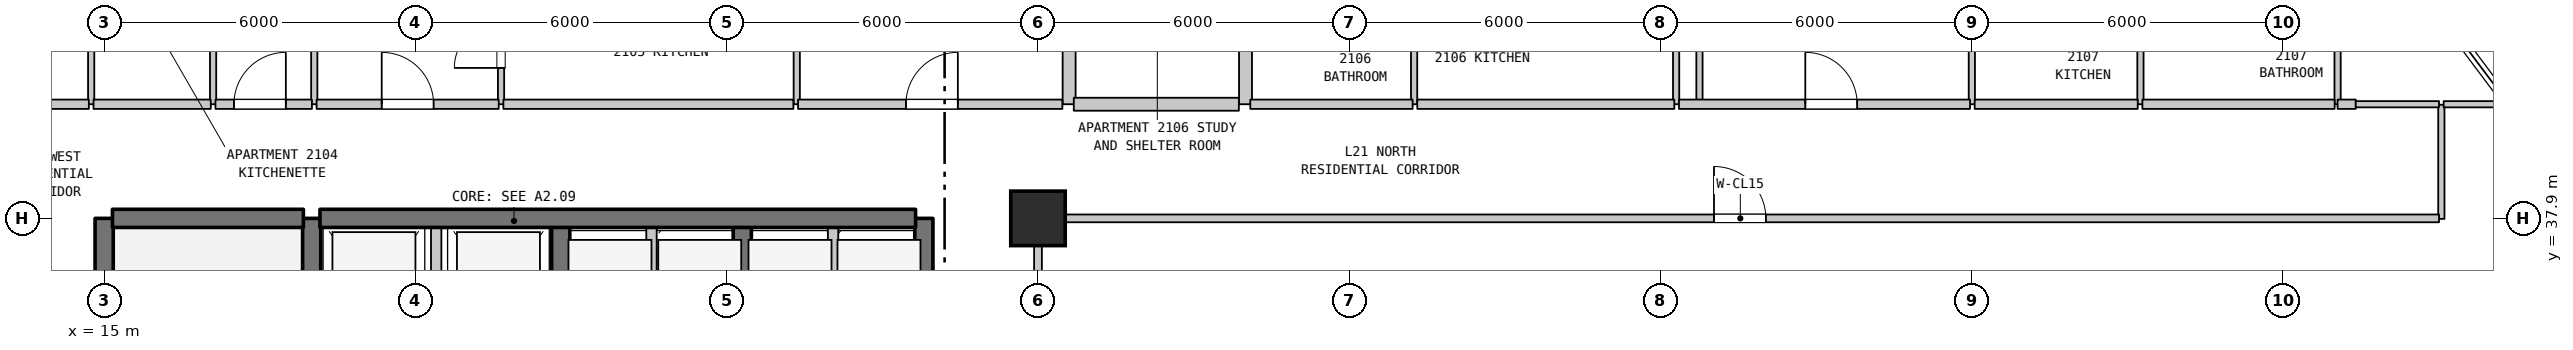
"""IFC4 building model, lengths in metres.
Left out: names, types, materials, properties, quantities, classifications, styles, units other than length and angle.
Written with IfcOpenShell. Run it as: python <this file> out.ifc"""

import sys

from ifc_helpers import new_model, si_unit, direction, frame, frame_2d, origin, origin_2d, place, context, subcontext, project, spatial, rectangle, extrude, element, fill, save


model = new_model("IFC4")
c1 = context("Model", 3, precision=1e-05, world=origin(), true_north=direction((0.0, 1.0)))
c2 = subcontext(c1, "Body", "Model", "MODEL_VIEW")
j1 = project(units=[si_unit("LENGTHUNIT", "METRE"), si_unit("PLANEANGLEUNIT", "RADIAN")], contexts=[c1])
p1 = place(None, origin())
s1 = spatial("IfcSite", under=j1, at=p1, CompositionType="ELEMENT")
p2 = place(p1, origin())
s2 = spatial("IfcBuilding", under=s1, at=p2, CompositionType="ELEMENT")
p3 = place(p2, frame((0.0, 0.0, 90.9)))
s3 = spatial("IfcBuildingStorey", under=s2, at=p3, CompositionType="ELEMENT", Elevation=90.9)
p4 = place(p3, frame((33.0, 37.9, 0.0), z_axis=(0.0, 0.0, 1.0), x_axis=(1.0, 0.0, 0.0)))
e1 = element("IfcColumn", 1, at=p4, inside=s3, PredefinedType="COLUMN", context=c2, shape_type="SweptSolid", body=[
    extrude(rectangle(XDim=1.05, YDim=1.05, at=origin_2d()), origin(), (0.0, 0.0, 1.0), 3.7),
])
p5 = place(p3, frame((14.75, 40.1, 0.0), z_axis=(0.0, 0.0, 1.0), x_axis=(0.0, 1.0, 0.0)))
e2 = element("IfcWall", 2, at=p5, inside=s3, PredefinedType="PARTITIONING", context=c2, shape_type="SweptSolid", body=[
    extrude(rectangle(XDim=3.2, YDim=0.12, at=frame_2d((1.6, 0.0))), origin(), (0.0, 0.0, 1.0), 3.385),
])
p6 = place(p5, frame((1.15, 0.0, 0.0)))
e3 = element("IfcOpeningElement", 3, at=p6, cuts=e2, PredefinedType="OPENING", context=c2, shape_type="SweptSolid", body=[
    extrude(rectangle(XDim=0.9, YDim=2.15, at=frame_2d((0.45, 1.075))), frame((0.0, 0.07, 0.0), z_axis=(0.0, -1.0, 0.0), x_axis=(1.0, 0.0, 0.0)), (0.0, 0.0, 1.0), 0.14),
])
p7 = place(p3, frame((15.0, 31.1, 0.0), z_axis=(0.0, 0.0, 1.0), x_axis=(0.0, 1.0, 0.0)))
e4 = element("IfcWall", 4, at=p7, inside=s3, PredefinedType="SHEAR", context=c2, shape_type="SweptSolid", body=[
    extrude(rectangle(XDim=6.8, YDim=0.35, at=frame_2d((3.4, 0.0))), origin(), (0.0, 0.0, 1.0), 3.385),
])
p8 = place(p3, frame((17.1, 40.1, 0.0), z_axis=(0.0, 0.0, 1.0), x_axis=(0.0, 1.0, 0.0)))
e5 = element("IfcWall", 5, at=p8, inside=s3, PredefinedType="PARTITIONING", context=c2, shape_type="SweptSolid", body=[
    extrude(rectangle(XDim=3.2, YDim=0.12, at=frame_2d((1.6, 0.0))), origin(), (0.0, 0.0, 1.0), 3.385),
])
p9 = place(p3, frame((19.0, 35.0, 0.0), z_axis=(0.0, 0.0, 1.0), x_axis=(0.0, 1.0, 0.0)))
e6 = element("IfcWall", 6, at=p9, inside=s3, PredefinedType="SHEAR", context=c2, shape_type="SweptSolid", body=[
    extrude(rectangle(XDim=2.9, YDim=0.35, at=frame_2d((1.45, 0.0))), origin(), (0.0, 0.0, 1.0), 3.385),
])
p10 = place(p3, frame((19.05, 40.1, 0.0), z_axis=(0.0, 0.0, 1.0), x_axis=(0.0, 1.0, 0.0)))
e7 = element("IfcWall", 7, at=p10, inside=s3, PredefinedType="PARTITIONING", context=c2, shape_type="SweptSolid", body=[
    extrude(rectangle(XDim=13.79, YDim=0.12, at=frame_2d((6.895, 0.0))), origin(), (0.0, 0.0, 1.0), 3.385),
])
p11 = place(p3, frame((21.4, 35.0, 0.0), z_axis=(0.0, 0.0, 1.0), x_axis=(0.0, 1.0, 0.0)))
e8 = element("IfcWall", 8, at=p11, inside=s3, PredefinedType="STANDARD", context=c2, shape_type="SweptSolid", body=[
    extrude(rectangle(XDim=2.9, YDim=0.2, at=frame_2d((1.45, 0.0))), origin(), (0.0, 0.0, 1.0), 3.385),
])
p12 = place(p3, frame((22.65, 40.1, 0.0), z_axis=(0.0, 0.0, 1.0), x_axis=(0.0, 1.0, 0.0)))
e9 = element("IfcWall", 9, at=p12, inside=s3, PredefinedType="PARTITIONING", context=c2, shape_type="SweptSolid", body=[
    extrude(rectangle(XDim=2.3, YDim=0.12, at=frame_2d((1.15, 0.0))), origin(), (0.0, 0.0, 1.0), 3.385),
])
p13 = place(p12, frame((0.7, 0.0, 0.0)))
e10 = element("IfcOpeningElement", 10, at=p13, cuts=e9, PredefinedType="OPENING", context=c2, shape_type="SweptSolid", body=[
    extrude(rectangle(XDim=0.9, YDim=2.15, at=frame_2d((0.45, 1.075))), frame((0.0, 0.07, 0.0), z_axis=(0.0, -1.0, 0.0), x_axis=(1.0, 0.0, 0.0)), (0.0, 0.0, 1.0), 0.14),
])
p14 = place(p3, frame((23.8, 35.0, 0.0), z_axis=(0.0, 0.0, 1.0), x_axis=(0.0, 1.0, 0.0)))
e11 = element("IfcWall", 11, at=p14, inside=s3, PredefinedType="SHEAR", context=c2, shape_type="SweptSolid", body=[
    extrude(rectangle(XDim=2.9, YDim=0.35, at=frame_2d((1.45, 0.0))), origin(), (0.0, 0.0, 1.0), 3.385),
])
p15 = place(p3, frame((25.55, 35.0, 0.0), z_axis=(0.0, 0.0, 1.0), x_axis=(0.0, 1.0, 0.0)))
e12 = element("IfcWall", 12, at=p15, inside=s3, PredefinedType="STANDARD", context=c2, shape_type="SweptSolid", body=[
    extrude(rectangle(XDim=2.9, YDim=0.2, at=frame_2d((1.45, 0.0))), origin(), (0.0, 0.0, 1.0), 3.385),
])
p16 = place(p3, frame((27.3, 35.0, 0.0), z_axis=(0.0, 0.0, 1.0), x_axis=(0.0, 1.0, 0.0)))
e13 = element("IfcWall", 13, at=p16, inside=s3, PredefinedType="SHEAR", context=c2, shape_type="SweptSolid", body=[
    extrude(rectangle(XDim=2.9, YDim=0.35, at=frame_2d((1.45, 0.0))), origin(), (0.0, 0.0, 1.0), 3.385),
])
p17 = place(p3, frame((28.35, 40.1, 0.0), z_axis=(0.0, 0.0, 1.0), x_axis=(0.0, 1.0, 0.0)))
e14 = element("IfcWall", 14, at=p17, inside=s3, PredefinedType="PARTITIONING", context=c2, shape_type="SweptSolid", body=[
    extrude(rectangle(XDim=2.05, YDim=0.12, at=frame_2d((1.025, 0.0))), origin(), (0.0, 0.0, 1.0), 3.385),
])
p18 = place(p3, frame((29.05, 35.0, 0.0), z_axis=(0.0, 0.0, 1.0), x_axis=(0.0, 1.0, 0.0)))
e15 = element("IfcWall", 15, at=p18, inside=s3, PredefinedType="STANDARD", context=c2, shape_type="SweptSolid", body=[
    extrude(rectangle(XDim=2.9, YDim=0.2, at=frame_2d((1.45, 0.0))), origin(), (0.0, 0.0, 1.0), 3.385),
])
p19 = place(p3, frame((30.8, 35.0, 0.0), z_axis=(0.0, 0.0, 1.0), x_axis=(0.0, 1.0, 0.0)))
e16 = element("IfcWall", 16, at=p19, inside=s3, PredefinedType="SHEAR", context=c2, shape_type="SweptSolid", body=[
    extrude(rectangle(XDim=2.9, YDim=0.35, at=frame_2d((1.45, 0.0))), origin(), (0.0, 0.0, 1.0), 3.385),
])
p20 = place(p3, frame((33.0, 27.91, 0.0), z_axis=(0.0, 0.0, 1.0), x_axis=(0.0, 1.0, 0.0)))
e17 = element("IfcWall", 17, at=p20, inside=s3, PredefinedType="STANDARD", context=c2, shape_type="SweptSolid", body=[
    extrude(rectangle(XDim=9.98, YDim=0.15, at=frame_2d((4.99, 0.0))), origin(), (0.0, 0.0, 1.0), 2.885),
])
for number, where, z_axis, x_axis in (
    (18, (33.6, 40.1, 0.0), (0.0, 0.0, 1.0), (0.0, 1.0, 0.0)),
    (19, (37.0, 40.1, 0.0), (0.0, 0.0, 1.0), (0.0, 1.0, 0.0)),
):
    element("IfcWall", number, at=place(p3, frame(where, z_axis=z_axis, x_axis=x_axis)), inside=s3, PredefinedType="STANDARD", context=c2, shape_type="SweptSolid", body=[
        extrude(rectangle(XDim=2.3, YDim=0.25, at=frame_2d((1.15, 0.0))), origin(), (0.0, 0.0, 1.0), 3.385),
    ])
for number, where, z_axis, x_axis in (
    (20, (40.25, 40.1, 0.0), (0.0, 0.0, 1.0), (0.0, 1.0, 0.0)),
    (21, (45.3, 40.1, 0.0), (0.0, 0.0, 1.0), (0.0, 1.0, 0.0)),
):
    element("IfcWall", number, at=place(p3, frame(where, z_axis=z_axis, x_axis=x_axis)), inside=s3, PredefinedType="PARTITIONING", context=c2, shape_type="SweptSolid", body=[
        extrude(rectangle(XDim=2.3, YDim=0.12, at=frame_2d((1.15, 0.0))), origin(), (0.0, 0.0, 1.0), 3.385),
    ])
p21 = place(p3, frame((45.75, 40.1, 0.0), z_axis=(0.0, 0.0, 1.0), x_axis=(0.0, 1.0, 0.0)))
e22 = element("IfcWall", 22, at=p21, inside=s3, PredefinedType="PARTITIONING", context=c2, shape_type="SweptSolid", body=[
    extrude(rectangle(XDim=2.05, YDim=0.12, at=frame_2d((1.025, 0.0))), origin(), (0.0, 0.0, 1.0), 3.385),
])
for number, where, z_axis, x_axis in (
    (23, (51.0, 40.1, 0.0), (0.0, 0.0, 1.0), (0.0, 1.0, 0.0)),
    (24, (54.25, 40.1, 0.0), (0.0, 0.0, 1.0), (0.0, 1.0, 0.0)),
    (25, (58.05, 40.1, 0.0), (0.0, 0.0, 1.0), (0.0, 1.0, 0.0)),
):
    element("IfcWall", number, at=place(p3, frame(where, z_axis=z_axis, x_axis=x_axis)), inside=s3, PredefinedType="PARTITIONING", context=c2, shape_type="SweptSolid", body=[
        extrude(rectangle(XDim=2.3, YDim=0.12, at=frame_2d((1.15, 0.0))), origin(), (0.0, 0.0, 1.0), 3.385),
    ])
p22 = place(p3, frame((60.05, 37.89, 0.0), z_axis=(0.0, 0.0, 1.0), x_axis=(0.0, 1.0, 0.0)))
e26 = element("IfcWall", 26, at=p22, inside=s3, PredefinedType="PARTITIONING", context=c2, shape_type="SweptSolid", body=[
    extrude(rectangle(XDim=2.2, YDim=0.12, at=frame_2d((1.1, 0.0))), origin(), (0.0, 0.0, 1.0), 3.385),
])
p23 = place(p3, frame((15.16, 37.9, 0.0), z_axis=(0.0, 0.0, 1.0), x_axis=(1.0, 0.0, 0.0)))
e27 = element("IfcWall", 27, at=p23, inside=s3, PredefinedType="SHEAR", context=c2, shape_type="SweptSolid", body=[
    extrude(rectangle(XDim=3.68, YDim=0.35, at=frame_2d((1.84, 0.0))), origin(), (0.0, 0.0, 1.0), 3.385),
])
p24 = place(p3, frame((19.16, 37.9, 0.0), z_axis=(0.0, 0.0, 1.0), x_axis=(1.0, 0.0, 0.0)))
e28 = element("IfcWall", 28, at=p24, inside=s3, PredefinedType="SHEAR", context=c2, shape_type="SweptSolid", body=[
    extrude(rectangle(XDim=11.48, YDim=0.35, at=frame_2d((5.74, 0.0))), origin(), (0.0, 0.0, 1.0), 3.385),
])
p25 = place(p3, frame((33.07, 37.9, 0.0), z_axis=(0.0, 0.0, 1.0), x_axis=(1.0, 0.0, 0.0)))
e29 = element("IfcWall", 29, at=p25, inside=s3, PredefinedType="STANDARD", context=c2, shape_type="SweptSolid", body=[
    extrude(rectangle(XDim=26.935, YDim=0.15, at=frame_2d((13.467, 0.0))), origin(), (0.0, 0.0, 1.0), 3.385),
])
p26 = place(p25, frame((12.96, 0.0, 0.0)))
e30 = element("IfcOpeningElement", 30, at=p26, cuts=e29, PredefinedType="OPENING", context=c2, shape_type="SweptSolid", body=[
    extrude(rectangle(XDim=1.0, YDim=2.15, at=frame_2d((0.5, 1.075))), frame((0.0, 0.085, 0.0), z_axis=(0.0, -1.0, 0.0), x_axis=(1.0, 0.0, 0.0)), (0.0, 0.0, 1.0), 0.17),
])
p27 = place(p3, frame((12.875, 40.1, 0.0), z_axis=(0.0, 0.0, 1.0), x_axis=(1.0, 0.0, 0.0)))
e31 = element("IfcWall", 31, at=p27, inside=s3, PredefinedType="STANDARD", context=c2, shape_type="SweptSolid", body=[
    extrude(rectangle(XDim=1.83, YDim=0.18, at=frame_2d((0.915, 0.0))), origin(), (0.0, 0.0, 1.0), 3.385),
])
p28 = place(p3, frame((14.795, 40.1, 0.0), z_axis=(0.0, 0.0, 1.0), x_axis=(1.0, 0.0, 0.0)))
e32 = element("IfcWall", 32, at=p28, inside=s3, PredefinedType="STANDARD", context=c2, shape_type="SweptSolid", body=[
    extrude(rectangle(XDim=2.26, YDim=0.18, at=frame_2d((1.13, 0.0))), origin(), (0.0, 0.0, 1.0), 3.385),
])
p29 = place(p3, frame((17.145, 40.1, 0.0), z_axis=(0.0, 0.0, 1.0), x_axis=(1.0, 0.0, 0.0)))
e33 = element("IfcWall", 33, at=p29, inside=s3, PredefinedType="STANDARD", context=c2, shape_type="SweptSolid", body=[
    extrude(rectangle(XDim=1.86, YDim=0.18, at=frame_2d((0.93, 0.0))), origin(), (0.0, 0.0, 1.0), 3.385),
])
p30 = place(p29, frame((0.357, 0.0, 0.0)))
e34 = element("IfcOpeningElement", 34, at=p30, cuts=e33, PredefinedType="OPENING", context=c2, shape_type="SweptSolid", body=[
    extrude(rectangle(XDim=1.0, YDim=2.15, at=frame_2d((0.5, 1.075))), frame((0.0, 0.1, 0.0), z_axis=(0.0, -1.0, 0.0), x_axis=(1.0, 0.0, 0.0)), (0.0, 0.0, 1.0), 0.2),
])
p31 = place(p3, frame((19.095, 40.1, 0.0), z_axis=(0.0, 0.0, 1.0), x_axis=(1.0, 0.0, 0.0)))
e35 = element("IfcWall", 35, at=p31, inside=s3, PredefinedType="STANDARD", context=c2, shape_type="SweptSolid", body=[
    extrude(rectangle(XDim=3.51, YDim=0.18, at=frame_2d((1.755, 0.0))), origin(), (0.0, 0.0, 1.0), 3.385),
])
p32 = place(p31, frame((1.255, 0.0, 0.0)))
e36 = element("IfcOpeningElement", 36, at=p32, cuts=e35, PredefinedType="OPENING", context=c2, shape_type="SweptSolid", body=[
    extrude(rectangle(XDim=1.0, YDim=2.15, at=frame_2d((0.5, 1.075))), frame((0.0, 0.1, 0.0), z_axis=(0.0, -1.0, 0.0), x_axis=(1.0, 0.0, 0.0)), (0.0, 0.0, 1.0), 0.2),
])
p33 = place(p3, frame((22.695, 40.1, 0.0), z_axis=(0.0, 0.0, 1.0), x_axis=(1.0, 0.0, 0.0)))
e37 = element("IfcWall", 37, at=p33, inside=s3, PredefinedType="STANDARD", context=c2, shape_type="SweptSolid", body=[
    extrude(rectangle(XDim=5.59, YDim=0.18, at=frame_2d((2.795, 0.0))), origin(), (0.0, 0.0, 1.0), 3.385),
])
p34 = place(p3, frame((28.375, 40.1, 0.0), z_axis=(0.0, 0.0, 1.0), x_axis=(1.0, 0.0, 0.0)))
e38 = element("IfcWall", 38, at=p34, inside=s3, PredefinedType="STANDARD", context=c2, shape_type="SweptSolid", body=[
    extrude(rectangle(XDim=5.095, YDim=0.18, at=frame_2d((2.547, 0.0))), origin(), (0.0, 0.0, 1.0), 3.385),
])
p35 = place(p34, frame((2.08, 0.0, 0.0)))
e39 = element("IfcOpeningElement", 39, at=p35, cuts=e38, PredefinedType="OPENING", context=c2, shape_type="SweptSolid", body=[
    extrude(rectangle(XDim=1.0, YDim=2.15, at=frame_2d((0.5, 1.075))), frame((0.0, 0.1, 0.0), z_axis=(0.0, -1.0, 0.0), x_axis=(1.0, 0.0, 0.0)), (0.0, 0.0, 1.0), 0.2),
])
p36 = place(p3, frame((33.69, 40.1, 0.0), z_axis=(0.0, 0.0, 1.0), x_axis=(1.0, 0.0, 0.0)))
e40 = element("IfcWall", 40, at=p36, inside=s3, PredefinedType="STANDARD", context=c2, shape_type="SweptSolid", body=[
    extrude(rectangle(XDim=3.182, YDim=0.25, at=frame_2d((1.591, 0.0))), origin(), (0.0, 0.0, 1.0), 3.385),
])
p37 = place(p3, frame((37.092, 40.1, 0.0), z_axis=(0.0, 0.0, 1.0), x_axis=(1.0, 0.0, 0.0)))
e41 = element("IfcWall", 41, at=p37, inside=s3, PredefinedType="STANDARD", context=c2, shape_type="SweptSolid", body=[
    extrude(rectangle(XDim=3.129, YDim=0.18, at=frame_2d((1.564, 0.0))), origin(), (0.0, 0.0, 1.0), 3.385),
])
p38 = place(p3, frame((40.311, 40.1, 0.0), z_axis=(0.0, 0.0, 1.0), x_axis=(1.0, 0.0, 0.0)))
e42 = element("IfcWall", 42, at=p38, inside=s3, PredefinedType="STANDARD", context=c2, shape_type="SweptSolid", body=[
    extrude(rectangle(XDim=4.954, YDim=0.18, at=frame_2d((2.477, 0.0))), origin(), (0.0, 0.0, 1.0), 3.385),
])
p39 = place(p3, frame((45.355, 40.1, 0.0), z_axis=(0.0, 0.0, 1.0), x_axis=(1.0, 0.0, 0.0)))
e43 = element("IfcWall", 43, at=p39, inside=s3, PredefinedType="STANDARD", context=c2, shape_type="SweptSolid", body=[
    extrude(rectangle(XDim=5.61, YDim=0.18, at=frame_2d((2.805, 0.0))), origin(), (0.0, 0.0, 1.0), 3.385),
])
p40 = place(p39, frame((2.435, 0.0, 0.0)))
e44 = element("IfcOpeningElement", 44, at=p40, cuts=e43, PredefinedType="OPENING", context=c2, shape_type="SweptSolid", body=[
    extrude(rectangle(XDim=1.0, YDim=2.15, at=frame_2d((0.5, 1.075))), frame((0.0, 0.1, 0.0), z_axis=(0.0, -1.0, 0.0), x_axis=(1.0, 0.0, 0.0)), (0.0, 0.0, 1.0), 0.2),
])
p41 = place(p3, frame((51.055, 40.1, 0.0), z_axis=(0.0, 0.0, 1.0), x_axis=(1.0, 0.0, 0.0)))
e45 = element("IfcWall", 45, at=p41, inside=s3, PredefinedType="STANDARD", context=c2, shape_type="SweptSolid", body=[
    extrude(rectangle(XDim=3.143, YDim=0.18, at=frame_2d((1.572, 0.0))), origin(), (0.0, 0.0, 1.0), 3.385),
])
p42 = place(p3, frame((54.288, 40.1, 0.0), z_axis=(0.0, 0.0, 1.0), x_axis=(1.0, 0.0, 0.0)))
e46 = element("IfcWall", 46, at=p42, inside=s3, PredefinedType="STANDARD", context=c2, shape_type="SweptSolid", body=[
    extrude(rectangle(XDim=3.705, YDim=0.18, at=frame_2d((1.853, 0.0))), origin(), (0.0, 0.0, 1.0), 3.385),
])
p43 = place(p3, frame((58.05, 40.1, 0.0), z_axis=(0.0, 0.0, 1.0), x_axis=(1.0, 0.0, 0.0)))
e47 = element("IfcWall", 47, at=p43, inside=s3, PredefinedType="STANDARD", context=c2, shape_type="SweptSolid", body=[
    extrude(rectangle(XDim=0.35, YDim=0.18, at=frame_2d((0.175, 0.0))), origin(), (0.0, 0.0, 1.0), 3.385),
])
p44 = place(p3, frame((58.4, 40.1, 0.0), z_axis=(0.0, 0.0, 1.0), x_axis=(1.0, 0.0, 0.0)))
e48 = element("IfcWall", 48, at=p44, inside=s3, PredefinedType="PARTITIONING", context=c2, shape_type="SweptSolid", body=[
    extrude(rectangle(XDim=1.605, YDim=0.12, at=frame_2d((0.802, 0.0))), origin(), (0.0, 0.0, 1.0), 3.385),
])
p45 = place(p3, frame((60.095, 40.1, 0.0), z_axis=(0.0, 0.0, 1.0), x_axis=(1.0, 0.0, 0.0)))
e49 = element("IfcWall", 49, at=p45, inside=s3, PredefinedType="PARTITIONING", context=c2, shape_type="SweptSolid", body=[
    extrude(rectangle(XDim=1.245, YDim=0.12, at=frame_2d((0.623, 0.0))), origin(), (0.0, 0.0, 1.0), 3.385),
])
p46 = place(p13, origin())
e50 = element("IfcDoor", 50, at=p46, inside=s3, OperationType="SINGLE_SWING_LEFT", PredefinedType="DOOR", context=c2, shape_type="SweptSolid", body=[
    extrude(rectangle(XDim=0.9, YDim=2.15, at=frame_2d((0.45, 1.075))), frame((0.0, 0.025, 0.0), z_axis=(0.0, -1.0, 0.0), x_axis=(1.0, 0.0, 0.0)), (0.0, 0.0, 1.0), 0.05),
])
fill(e10, e50)
p47 = place(p26, origin())
e51 = element("IfcDoor", 51, at=p47, inside=s3, OperationType="SINGLE_SWING_LEFT", PredefinedType="DOOR", context=c2, shape_type="SweptSolid", body=[
    extrude(rectangle(XDim=1.0, YDim=2.15, at=frame_2d((0.5, 1.075))), frame((0.0, 0.025, 0.0), z_axis=(0.0, -1.0, 0.0), x_axis=(1.0, 0.0, 0.0)), (0.0, 0.0, 1.0), 0.05),
])
fill(e30, e51)
p48 = place(p30, origin())
e52 = element("IfcDoor", 52, at=p48, inside=s3, OperationType="SINGLE_SWING_RIGHT", PredefinedType="DOOR", context=c2, shape_type="SweptSolid", body=[
    extrude(rectangle(XDim=1.0, YDim=2.15, at=frame_2d((0.5, 1.075))), frame((0.0, 0.025, 0.0), z_axis=(0.0, -1.0, 0.0), x_axis=(1.0, 0.0, 0.0)), (0.0, 0.0, 1.0), 0.05),
])
fill(e34, e52)
p49 = place(p32, origin())
e53 = element("IfcDoor", 53, at=p49, inside=s3, OperationType="SINGLE_SWING_LEFT", PredefinedType="DOOR", context=c2, shape_type="SweptSolid", body=[
    extrude(rectangle(XDim=1.0, YDim=2.15, at=frame_2d((0.5, 1.075))), frame((0.0, 0.025, 0.0), z_axis=(0.0, -1.0, 0.0), x_axis=(1.0, 0.0, 0.0)), (0.0, 0.0, 1.0), 0.05),
])
fill(e36, e53)
p50 = place(p35, origin())
e54 = element("IfcDoor", 54, at=p50, inside=s3, OperationType="SINGLE_SWING_RIGHT", PredefinedType="DOOR", context=c2, shape_type="SweptSolid", body=[
    extrude(rectangle(XDim=1.0, YDim=2.15, at=frame_2d((0.5, 1.075))), frame((0.0, 0.025, 0.0), z_axis=(0.0, -1.0, 0.0), x_axis=(1.0, 0.0, 0.0)), (0.0, 0.0, 1.0), 0.05),
])
fill(e39, e54)
p51 = place(p40, origin())
e55 = element("IfcDoor", 55, at=p51, inside=s3, OperationType="SINGLE_SWING_LEFT", PredefinedType="DOOR", context=c2, shape_type="SweptSolid", body=[
    extrude(rectangle(XDim=1.0, YDim=2.15, at=frame_2d((0.5, 1.075))), frame((0.0, 0.025, 0.0), z_axis=(0.0, -1.0, 0.0), x_axis=(1.0, 0.0, 0.0)), (0.0, 0.0, 1.0), 0.05),
])
fill(e44, e55)
save(model, sys.argv[1])
